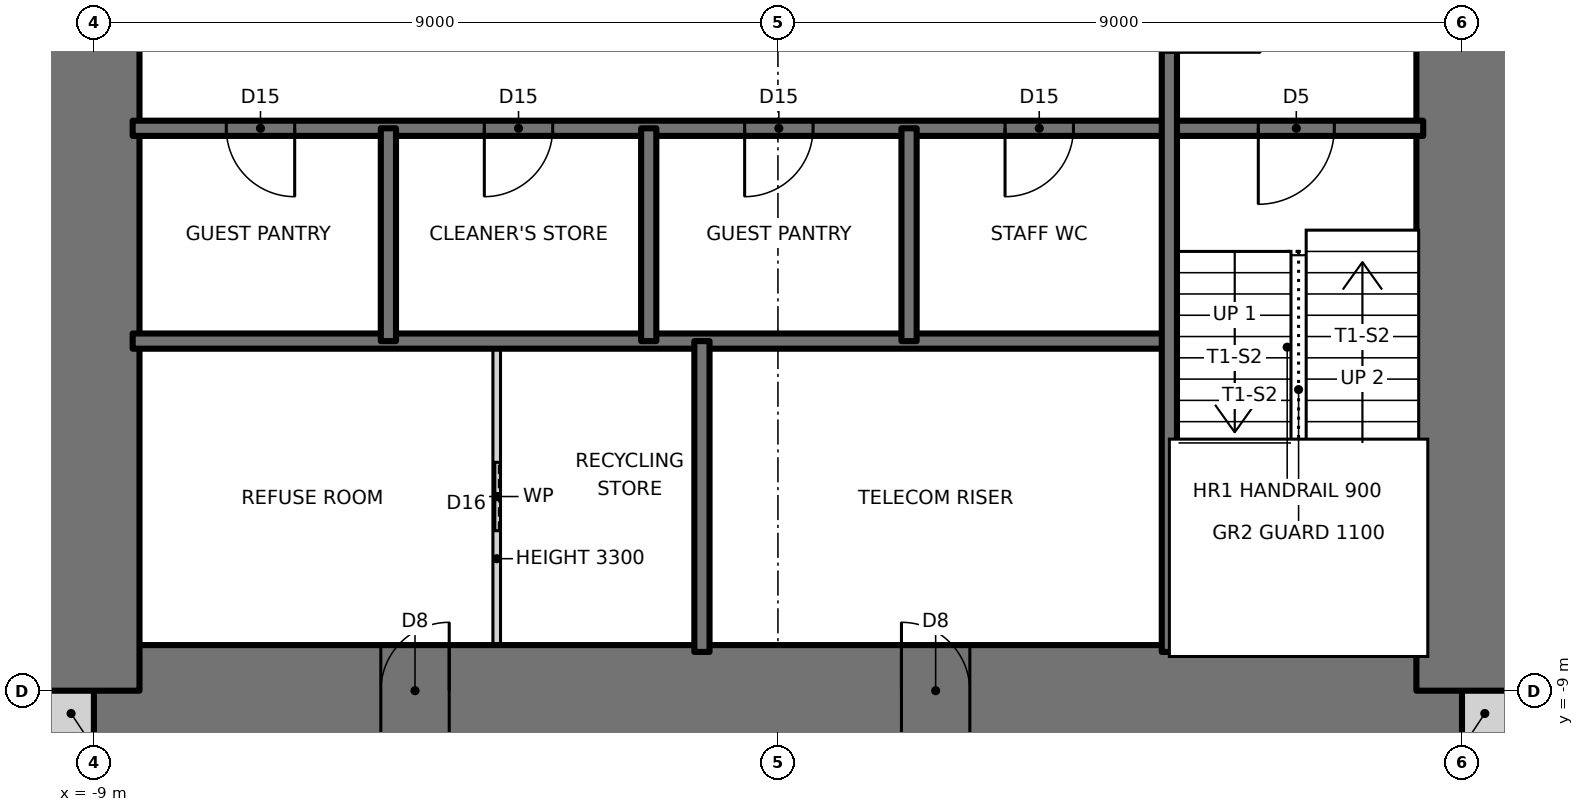
"""IFC4 building model, lengths in metres.
Left out: names, types, materials, properties, quantities, classifications, styles, units other than length and angle.
Written with IfcOpenShell. Run it as: python <this file> out.ifc"""

import sys

from ifc_helpers import new_model, si_unit, direction, frame, frame_2d, origin, place, context, subcontext, project, spatial, rectangle, extrude, element, fill, save


model = new_model("IFC4")
c1 = context("Model", 3, precision=1e-05, world=origin(), true_north=direction((0.0, 1.0)))
c2 = subcontext(c1, "Body", "Model", "MODEL_VIEW")
j1 = project(units=[si_unit("LENGTHUNIT", "METRE"), si_unit("PLANEANGLEUNIT", "RADIAN")], contexts=[c1])
p1 = place(None, origin())
s1 = spatial("IfcSite", under=j1, at=p1, CompositionType="ELEMENT")
p2 = place(p1, origin())
s2 = spatial("IfcBuilding", under=s1, at=p2, CompositionType="ELEMENT")
p3 = place(p2, frame((0.0, 0.0, 170.5)))
s3 = spatial("IfcBuildingStorey", under=s2, at=p3, CompositionType="ELEMENT", Elevation=170.5)
for number, where, z_axis, x_axis in (
    (1, (-9.6, -9.3, 0.0), (0.0, 0.0, 1.0), (1.0, 0.0, 0.0)),
    (2, (9.0, -9.3, 0.0), (0.0, 0.0, 1.0), (1.0, 0.0, 0.0)),
):
    element("IfcWall", number, at=place(p3, frame(where, z_axis=z_axis, x_axis=x_axis)), inside=s3, PredefinedType="SOLIDWALL", context=c2, shape_type="SweptSolid", body=[
        extrude(rectangle(XDim=0.6, YDim=0.6, at=frame_2d((0.3, 0.0))), origin(), (0.0, 0.0, 1.0), 3.5),
    ])
p4 = place(p3, frame((-9.0, -9.0, 0.0), z_axis=(0.0, 0.0, 1.0), x_axis=(1.0, 0.0, 0.0)))
e3 = element("IfcWall", 3, at=p4, inside=s3, PredefinedType="SHEAR", context=c2, shape_type="SweptSolid", body=[
    extrude(rectangle(XDim=18.0, YDim=1.2, at=frame_2d((9.0, 0.0))), origin(), (0.0, 0.0, 1.0), 3.5),
])
p5 = place(p4, frame((3.775, 0.0, 0.0)))
e4 = element("IfcOpeningElement", 4, at=p5, cuts=e3, PredefinedType="OPENING", context=c2, shape_type="SweptSolid", body=[
    extrude(rectangle(XDim=0.9, YDim=2.1, at=frame_2d((0.45, 1.05))), frame((0.0, 0.61, 0.0), z_axis=(0.0, -1.0, 0.0), x_axis=(1.0, 0.0, 0.0)), (0.0, 0.0, 1.0), 1.22),
])
p6 = place(p4, frame((10.625, 0.0, 0.0)))
e5 = element("IfcOpeningElement", 5, at=p6, cuts=e3, PredefinedType="OPENING", context=c2, shape_type="SweptSolid", body=[
    extrude(rectangle(XDim=0.9, YDim=2.1, at=frame_2d((0.45, 1.05))), frame((0.0, 0.61, 0.0), z_axis=(0.0, -1.0, 0.0), x_axis=(1.0, 0.0, 0.0)), (0.0, 0.0, 1.0), 1.22),
])
p7 = place(p3, frame((9.0, -9.0, 0.0), z_axis=(0.0, 0.0, 1.0), x_axis=(0.0, 1.0, 0.0)))
e6 = element("IfcWall", 6, at=p7, inside=s3, PredefinedType="SHEAR", context=c2, shape_type="SweptSolid", body=[
    extrude(rectangle(XDim=18.0, YDim=1.2, at=frame_2d((9.0, 0.0))), origin(), (0.0, 0.0, 1.0), 3.5),
])
p8 = place(p7, frame((8.5, 0.0, 0.0)))
e7 = element("IfcOpeningElement", 7, at=p8, cuts=e6, PredefinedType="OPENING", context=c2, shape_type="SweptSolid", body=[
    extrude(rectangle(XDim=1.0, YDim=2.1, at=frame_2d((0.5, 1.05))), frame((0.0, 0.61, 0.0), z_axis=(0.0, -1.0, 0.0), x_axis=(1.0, 0.0, 0.0)), (0.0, 0.0, 1.0), 1.22),
])
p9 = place(p3, frame((-9.0, 9.0, 0.0), z_axis=(0.0, 0.0, 1.0), x_axis=(0.0, -1.0, 0.0)))
e8 = element("IfcWall", 8, at=p9, inside=s3, PredefinedType="SHEAR", context=c2, shape_type="SweptSolid", body=[
    extrude(rectangle(XDim=18.0, YDim=1.2, at=frame_2d((9.0, 0.0))), origin(), (0.0, 0.0, 1.0), 3.5),
])
p10 = place(p9, frame((8.5, 0.0, 0.0)))
e9 = element("IfcOpeningElement", 9, at=p10, cuts=e8, PredefinedType="OPENING", context=c2, shape_type="SweptSolid", body=[
    extrude(rectangle(XDim=1.0, YDim=2.1, at=frame_2d((0.5, 1.05))), frame((0.0, 0.61, 0.0), z_axis=(0.0, -1.0, 0.0), x_axis=(1.0, 0.0, 0.0)), (0.0, 0.0, 1.0), 1.22),
])
p11 = place(p3, frame((-8.49, -4.4, 0.0), z_axis=(0.0, 0.0, 1.0), x_axis=(1.0, 0.0, 0.0)))
e10 = element("IfcWall", 10, at=p11, inside=s3, PredefinedType="SOLIDWALL", context=c2, shape_type="SweptSolid", body=[
    extrude(rectangle(XDim=13.64, YDim=0.2, at=frame_2d((6.82, 0.0))), origin(), (0.0, 0.0, 1.0), 3.5),
])
p12 = place(p3, frame((-8.49, -1.6, 0.0), z_axis=(0.0, 0.0, 1.0), x_axis=(1.0, 0.0, 0.0)))
e11 = element("IfcWall", 11, at=p12, inside=s3, PredefinedType="SOLIDWALL", context=c2, shape_type="SweptSolid", body=[
    extrude(rectangle(XDim=16.98, YDim=0.2, at=frame_2d((8.49, 0.0))), origin(), (0.0, 0.0, 1.0), 3.5),
])
p13 = place(p12, frame((14.81, 0.0, 0.0)))
e12 = element("IfcOpeningElement", 12, at=p13, cuts=e11, PredefinedType="OPENING", context=c2, shape_type="SweptSolid", body=[
    extrude(rectangle(XDim=1.0, YDim=2.1, at=frame_2d((0.5, 1.05))), frame((0.0, 0.11, 0.0), z_axis=(0.0, -1.0, 0.0), x_axis=(1.0, 0.0, 0.0)), (0.0, 0.0, 1.0), 0.22),
])
p14 = place(p12, frame((1.232, 0.0, 0.0)))
e13 = element("IfcOpeningElement", 13, at=p14, cuts=e11, PredefinedType="OPENING", context=c2, shape_type="SweptSolid", body=[
    extrude(rectangle(XDim=0.9, YDim=2.1, at=frame_2d((0.45, 1.05))), frame((0.0, 0.11, 0.0), z_axis=(0.0, -1.0, 0.0), x_axis=(1.0, 0.0, 0.0)), (0.0, 0.0, 1.0), 0.22),
])
p15 = place(p12, frame((4.627, 0.0, 0.0)))
e14 = element("IfcOpeningElement", 14, at=p15, cuts=e11, PredefinedType="OPENING", context=c2, shape_type="SweptSolid", body=[
    extrude(rectangle(XDim=0.9, YDim=2.1, at=frame_2d((0.45, 1.05))), frame((0.0, 0.11, 0.0), z_axis=(0.0, -1.0, 0.0), x_axis=(1.0, 0.0, 0.0)), (0.0, 0.0, 1.0), 0.22),
])
p16 = place(p12, frame((8.052, 0.0, 0.0)))
e15 = element("IfcOpeningElement", 15, at=p16, cuts=e11, PredefinedType="OPENING", context=c2, shape_type="SweptSolid", body=[
    extrude(rectangle(XDim=0.9, YDim=2.1, at=frame_2d((0.45, 1.05))), frame((0.0, 0.11, 0.0), z_axis=(0.0, -1.0, 0.0), x_axis=(1.0, 0.0, 0.0)), (0.0, 0.0, 1.0), 0.22),
])
p17 = place(p12, frame((11.478, 0.0, 0.0)))
e16 = element("IfcOpeningElement", 16, at=p17, cuts=e11, PredefinedType="OPENING", context=c2, shape_type="SweptSolid", body=[
    extrude(rectangle(XDim=0.9, YDim=2.1, at=frame_2d((0.45, 1.05))), frame((0.0, 0.11, 0.0), z_axis=(0.0, -1.0, 0.0), x_axis=(1.0, 0.0, 0.0)), (0.0, 0.0, 1.0), 0.22),
])
p18 = place(p3, frame((5.15, -8.49, 0.0), z_axis=(0.0, 0.0, 1.0), x_axis=(0.0, 1.0, 0.0)))
e17 = element("IfcWall", 17, at=p18, inside=s3, PredefinedType="SOLIDWALL", context=c2, shape_type="SweptSolid", body=[
    extrude(rectangle(XDim=13.09, YDim=0.2, at=frame_2d((6.545, 0.0))), origin(), (0.0, 0.0, 1.0), 3.5),
])
p19 = place(p18, frame((7.89, 0.0, 0.0)))
e18 = element("IfcOpeningElement", 18, at=p19, cuts=e17, PredefinedType="OPENING", context=c2, shape_type="SweptSolid", body=[
    extrude(rectangle(XDim=1.2, YDim=2.1, at=frame_2d((0.6, 1.05))), frame((0.0, 0.11, 0.0), z_axis=(0.0, -1.0, 0.0), x_axis=(1.0, 0.0, 0.0)), (0.0, 0.0, 1.0), 0.22),
])
p20 = place(p3, frame((1.725, -4.4, 0.0), z_axis=(0.0, 0.0, 1.0), x_axis=(0.0, 1.0, 0.0)))
e19 = element("IfcWall", 19, at=p20, inside=s3, PredefinedType="SOLIDWALL", context=c2, shape_type="SweptSolid", body=[
    extrude(rectangle(XDim=2.8, YDim=0.2, at=frame_2d((1.4, 0.0))), origin(), (0.0, 0.0, 1.0), 3.5),
])
p21 = place(p3, frame((-1.0, -8.49, 0.0), z_axis=(0.0, 0.0, 1.0), x_axis=(0.0, 1.0, 0.0)))
e20 = element("IfcWall", 20, at=p21, inside=s3, PredefinedType="SOLIDWALL", context=c2, shape_type="SweptSolid", body=[
    extrude(rectangle(XDim=4.09, YDim=0.2, at=frame_2d((2.045, 0.0))), origin(), (0.0, 0.0, 1.0), 3.5),
])
p22 = place(p3, frame((-1.7, -4.4, 0.0), z_axis=(0.0, 0.0, 1.0), x_axis=(0.0, 1.0, 0.0)))
e21 = element("IfcWall", 21, at=p22, inside=s3, PredefinedType="SOLIDWALL", context=c2, shape_type="SweptSolid", body=[
    extrude(rectangle(XDim=2.8, YDim=0.2, at=frame_2d((1.4, 0.0))), origin(), (0.0, 0.0, 1.0), 3.5),
])
p23 = place(p3, frame((-3.7, -8.49, 0.0), z_axis=(0.0, 0.0, 1.0), x_axis=(0.0, 1.0, 0.0)))
e22 = element("IfcWall", 22, at=p23, inside=s3, PredefinedType="PARTITIONING", context=c2, shape_type="SweptSolid", body=[
    extrude(rectangle(XDim=4.09, YDim=0.1, at=frame_2d((2.045, 0.0))), origin(), (0.0, 0.0, 1.0), 3.3),
])
p24 = place(p23, frame((1.595, 0.0, 0.0)))
e23 = element("IfcOpeningElement", 23, at=p24, cuts=e22, PredefinedType="OPENING", context=c2, shape_type="SweptSolid", body=[
    extrude(rectangle(XDim=0.9, YDim=2.1, at=frame_2d((0.45, 1.05))), frame((0.0, 0.06, 0.0), z_axis=(0.0, -1.0, 0.0), x_axis=(1.0, 0.0, 0.0)), (0.0, 0.0, 1.0), 0.12),
])
p25 = place(p3, frame((-5.125, -4.4, 0.0), z_axis=(0.0, 0.0, 1.0), x_axis=(0.0, 1.0, 0.0)))
e24 = element("IfcWall", 24, at=p25, inside=s3, PredefinedType="SOLIDWALL", context=c2, shape_type="SweptSolid", body=[
    extrude(rectangle(XDim=2.8, YDim=0.2, at=frame_2d((1.4, 0.0))), origin(), (0.0, 0.0, 1.0), 3.5),
])
p26 = place(p13, frame((1.0, 0.0, 0.0), z_axis=(0.0, 0.0, 1.0), x_axis=(-1.0, 0.0, 0.0)))
e25 = element("IfcDoor", 25, at=p26, inside=s3, OperationType="SINGLE_SWING_RIGHT", PredefinedType="DOOR", context=c2, shape_type="SweptSolid", body=[
    extrude(rectangle(XDim=1.0, YDim=2.1, at=frame_2d((0.5, 1.05))), frame((0.0, 0.025, 0.0), z_axis=(0.0, -1.0, 0.0), x_axis=(1.0, 0.0, 0.0)), (0.0, 0.0, 1.0), 0.05),
])
fill(e12, e25)
p27 = place(p19, frame((1.2, 0.0, 0.0), z_axis=(0.0, 0.0, 1.0), x_axis=(-1.0, 0.0, 0.0)))
e26 = element("IfcDoor", 26, at=p27, inside=s3, OperationType="SINGLE_SWING_RIGHT", PredefinedType="DOOR", context=c2, shape_type="SweptSolid", body=[
    extrude(rectangle(XDim=1.2, YDim=2.1, at=frame_2d((0.6, 1.05))), frame((0.0, 0.025, 0.0), z_axis=(0.0, -1.0, 0.0), x_axis=(1.0, 0.0, 0.0)), (0.0, 0.0, 1.0), 0.05),
])
fill(e18, e26)
p28 = place(p14, frame((0.9, 0.0, 0.0), z_axis=(0.0, 0.0, 1.0), x_axis=(-1.0, 0.0, 0.0)))
e27 = element("IfcDoor", 27, at=p28, inside=s3, OperationType="SINGLE_SWING_LEFT", PredefinedType="DOOR", context=c2, shape_type="SweptSolid", body=[
    extrude(rectangle(XDim=0.9, YDim=2.1, at=frame_2d((0.45, 1.05))), frame((0.0, 0.025, 0.0), z_axis=(0.0, -1.0, 0.0), x_axis=(1.0, 0.0, 0.0)), (0.0, 0.0, 1.0), 0.05),
])
fill(e13, e27)
p29 = place(p15, frame((0.9, 0.0, 0.0), z_axis=(0.0, 0.0, 1.0), x_axis=(-1.0, 0.0, 0.0)))
e28 = element("IfcDoor", 28, at=p29, inside=s3, OperationType="SINGLE_SWING_RIGHT", PredefinedType="DOOR", context=c2, shape_type="SweptSolid", body=[
    extrude(rectangle(XDim=0.9, YDim=2.1, at=frame_2d((0.45, 1.05))), frame((0.0, 0.025, 0.0), z_axis=(0.0, -1.0, 0.0), x_axis=(1.0, 0.0, 0.0)), (0.0, 0.0, 1.0), 0.05),
])
fill(e14, e28)
p30 = place(p16, frame((0.9, 0.0, 0.0), z_axis=(0.0, 0.0, 1.0), x_axis=(-1.0, 0.0, 0.0)))
e29 = element("IfcDoor", 29, at=p30, inside=s3, OperationType="SINGLE_SWING_RIGHT", PredefinedType="DOOR", context=c2, shape_type="SweptSolid", body=[
    extrude(rectangle(XDim=0.9, YDim=2.1, at=frame_2d((0.45, 1.05))), frame((0.0, 0.025, 0.0), z_axis=(0.0, -1.0, 0.0), x_axis=(1.0, 0.0, 0.0)), (0.0, 0.0, 1.0), 0.05),
])
fill(e15, e29)
p31 = place(p17, frame((0.9, 0.0, 0.0), z_axis=(0.0, 0.0, 1.0), x_axis=(-1.0, 0.0, 0.0)))
e30 = element("IfcDoor", 30, at=p31, inside=s3, OperationType="SINGLE_SWING_RIGHT", PredefinedType="DOOR", context=c2, shape_type="SweptSolid", body=[
    extrude(rectangle(XDim=0.9, YDim=2.1, at=frame_2d((0.45, 1.05))), frame((0.0, 0.025, 0.0), z_axis=(0.0, -1.0, 0.0), x_axis=(1.0, 0.0, 0.0)), (0.0, 0.0, 1.0), 0.05),
])
fill(e16, e30)
p32 = place(p24, origin())
e31 = element("IfcDoor", 31, at=p32, inside=s3, OperationType="SLIDING_TO_LEFT", PredefinedType="DOOR", context=c2, shape_type="SweptSolid", body=[
    extrude(rectangle(XDim=0.9, YDim=2.1, at=frame_2d((0.45, 1.05))), frame((0.0, 0.025, 0.0), z_axis=(0.0, -1.0, 0.0), x_axis=(1.0, 0.0, 0.0)), (0.0, 0.0, 1.0), 0.05),
])
fill(e23, e31)
p33 = place(p5, origin())
e32 = element("IfcDoor", 32, at=p33, inside=s3, OperationType="SINGLE_SWING_RIGHT", PredefinedType="DOOR", context=c2, shape_type="SweptSolid", body=[
    extrude(rectangle(XDim=0.9, YDim=2.1, at=frame_2d((0.45, 1.05))), frame((0.0, 0.025, 0.0), z_axis=(0.0, -1.0, 0.0), x_axis=(1.0, 0.0, 0.0)), (0.0, 0.0, 1.0), 0.05),
])
fill(e4, e32)
p34 = place(p6, origin())
e33 = element("IfcDoor", 33, at=p34, inside=s3, OperationType="SINGLE_SWING_LEFT", PredefinedType="DOOR", context=c2, shape_type="SweptSolid", body=[
    extrude(rectangle(XDim=0.9, YDim=2.1, at=frame_2d((0.45, 1.05))), frame((0.0, 0.025, 0.0), z_axis=(0.0, -1.0, 0.0), x_axis=(1.0, 0.0, 0.0)), (0.0, 0.0, 1.0), 0.05),
])
fill(e5, e33)
save(model, sys.argv[1])
